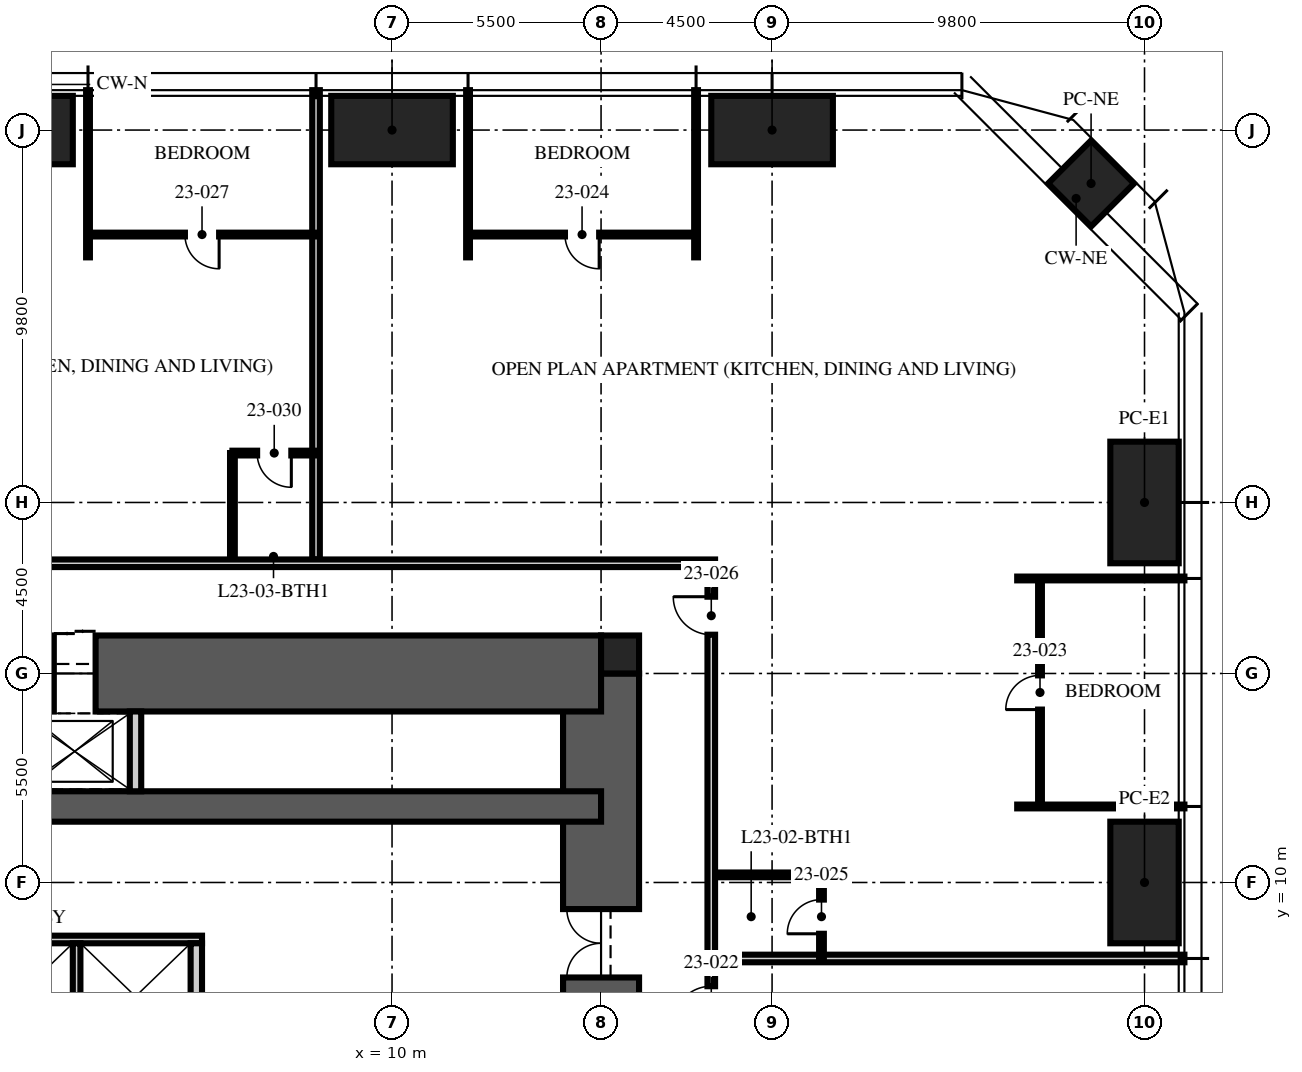
"""IFC4 building model, lengths in metres.
Left out: names, types, materials, properties, quantities, classifications, styles, units other than length and angle.
Written with IfcOpenShell. Run it as: python <this file> out.ifc"""

import sys

from ifc_helpers import new_model, si_unit, direction, frame, frame_2d, origin, origin_2d, place, context, subcontext, project, spatial, rectangle, hollow_rectangle, extrude, element, fill, save


model = new_model("IFC4")
c1 = context("Model", 3, precision=1e-05, world=origin(), true_north=direction((0.0, 1.0)))
c2 = subcontext(c1, "Body", "Model", "MODEL_VIEW")
j1 = project(units=[si_unit("LENGTHUNIT", "METRE"), si_unit("PLANEANGLEUNIT", "RADIAN")], contexts=[c1])
p1 = place(None, origin())
s1 = spatial("IfcSite", under=j1, at=p1, CompositionType="ELEMENT")
p2 = place(p1, origin())
s2 = spatial("IfcBuilding", under=s1, at=p2, CompositionType="ELEMENT")
p3 = place(p2, frame((0.0, 0.0, 92.25)))
s3 = spatial("IfcBuildingStorey", under=s2, at=p3, CompositionType="ELEMENT", Elevation=92.25)
p4 = place(p3, frame((15.5, -15.5, -0.25), z_axis=(0.0, 0.0, 1.0), x_axis=(0.0, 1.0, 0.0)))
e1 = element("IfcWall", 1, at=p4, inside=s3, PredefinedType="SHEAR", context=c2, shape_type="SweptSolid", body=[
    extrude(rectangle(XDim=31.0, YDim=2.0, at=frame_2d((15.5, 0.0))), origin(), (0.0, 0.0, 1.0), 3.75),
])
p5 = place(p4, frame((6.5, 0.0, 0.25)))
e2 = element("IfcOpeningElement", 2, at=p5, cuts=e1, PredefinedType="OPENING", context=c2, shape_type="SweptSolid", body=[
    extrude(rectangle(XDim=1.2, YDim=2.1, at=frame_2d((0.6, 1.05))), frame((0.0, 1.01, 0.0), z_axis=(0.0, -1.0, 0.0), x_axis=(1.0, 0.0, 0.0)), (0.0, 0.0, 1.0), 2.02),
])
p6 = place(p4, frame((23.0, 0.0, 0.25)))
e3 = element("IfcOpeningElement", 3, at=p6, cuts=e1, PredefinedType="OPENING", context=c2, shape_type="SweptSolid", body=[
    extrude(rectangle(XDim=1.8, YDim=2.1, at=frame_2d((0.9, 1.05))), frame((0.0, 1.01, 0.0), z_axis=(0.0, -1.0, 0.0), x_axis=(1.0, 0.0, 0.0)), (0.0, 0.0, 1.0), 2.02),
])
p7 = place(p3, frame((-15.5, 15.5, -0.25), z_axis=(0.0, 0.0, 1.0), x_axis=(1.0, 0.0, 0.0)))
e4 = element("IfcWall", 4, at=p7, inside=s3, PredefinedType="SHEAR", context=c2, shape_type="SweptSolid", body=[
    extrude(rectangle(XDim=31.0, YDim=2.0, at=frame_2d((15.5, 0.0))), origin(), (0.0, 0.0, 1.0), 3.75),
])
p8 = place(p7, frame((10.4, 0.0, 0.25)))
e5 = element("IfcOpeningElement", 5, at=p8, cuts=e4, PredefinedType="OPENING", context=c2, shape_type="SweptSolid", body=[
    extrude(rectangle(XDim=1.1, YDim=2.1, at=frame_2d((0.55, 1.05))), frame((0.0, 1.01, 0.0), z_axis=(0.0, -1.0, 0.0), x_axis=(1.0, 0.0, 0.0)), (0.0, 0.0, 1.0), 2.02),
])
p9 = place(p7, frame((13.5, 0.0, 0.25)))
e6 = element("IfcOpeningElement", 6, at=p9, cuts=e4, PredefinedType="OPENING", context=c2, shape_type="SweptSolid", body=[
    extrude(rectangle(XDim=1.1, YDim=2.1, at=frame_2d((0.55, 1.05))), frame((0.0, 1.01, 0.0), z_axis=(0.0, -1.0, 0.0), x_axis=(1.0, 0.0, 0.0)), (0.0, 0.0, 1.0), 2.02),
])
p10 = place(p7, frame((16.6, 0.0, 0.25)))
e7 = element("IfcOpeningElement", 7, at=p10, cuts=e4, PredefinedType="OPENING", context=c2, shape_type="SweptSolid", body=[
    extrude(rectangle(XDim=1.1, YDim=2.1, at=frame_2d((0.55, 1.05))), frame((0.0, 1.01, 0.0), z_axis=(0.0, -1.0, 0.0), x_axis=(1.0, 0.0, 0.0)), (0.0, 0.0, 1.0), 2.02),
])
p11 = place(p3, frame((-15.5, 12.0, -0.25), z_axis=(0.0, 0.0, 1.0), x_axis=(1.0, 0.0, 0.0)))
e8 = element("IfcWall", 8, at=p11, inside=s3, PredefinedType="SHEAR", context=c2, shape_type="SweptSolid", body=[
    extrude(rectangle(XDim=31.0, YDim=0.8, at=frame_2d((15.5, 0.0))), origin(), (0.0, 0.0, 1.0), 3.75),
])
p12 = place(p3, frame((16.0, 16.0, -0.25), z_axis=(0.0, 0.0, 1.0), x_axis=(1.0, 0.0, 0.0)))
e9 = element("IfcColumn", 9, at=p12, inside=s3, PredefinedType="COLUMN", context=c2, shape_type="SweptSolid", body=[
    extrude(rectangle(XDim=1.0, YDim=1.0, at=origin_2d()), origin(), (0.0, 0.0, 1.0), 3.75),
])
for number, where, z_axis, x_axis in (
    (10, (0.0, 29.8, 0.0), (0.0, 0.0, 1.0), (1.0, 0.0, 0.0)),
    (11, (10.0, 29.8, 0.0), (0.0, 0.0, 1.0), (1.0, 0.0, 0.0)),
    (12, (20.0, 29.8, 0.0), (0.0, 0.0, 1.0), (1.0, 0.0, 0.0)),
    (13, (29.8, 20.0, 0.0), (0.0, 0.0, 1.0), (0.0, 1.0, 0.0)),
    (14, (29.8, 10.0, 0.0), (0.0, 0.0, 1.0), (0.0, 1.0, 0.0)),
):
    element("IfcColumn", number, at=place(p3, frame(where, z_axis=z_axis, x_axis=x_axis)), inside=s3, PredefinedType="COLUMN", context=c2, shape_type="SweptSolid", body=[
        extrude(hollow_rectangle(XDim=3.2, YDim=1.8, WallThickness=0.2, at=origin_2d()), origin(), (0.0, 0.0, 1.0), 3.75),
    ])
p13 = place(p3, frame((28.394, 28.394, 0.0), z_axis=(0.0, 0.0, 1.0), x_axis=(0.707106781187, -0.707106781187, 0.0)))
e15 = element("IfcColumn", 15, at=p13, inside=s3, PredefinedType="COLUMN", context=c2, shape_type="SweptSolid", body=[
    extrude(hollow_rectangle(XDim=1.6, YDim=1.6, WallThickness=0.1, at=origin_2d()), origin(), (0.0, 0.0, 1.0), 3.75),
])
p14 = place(p3, frame((-4.7, 8.5, 0.0), z_axis=(0.0, 0.0, 1.0), x_axis=(1.0, 0.0, 0.0)))
e16 = element("IfcWall", 16, at=p14, inside=s3, PredefinedType="PARTITIONING", context=c2, shape_type="SweptSolid", body=[
    extrude(rectangle(XDim=9.7, YDim=0.2, at=frame_2d((4.85, 0.0))), origin(), (0.0, 0.0, 1.0), 3.5),
])
p15 = place(p3, frame((4.85, 5.6, 0.0), z_axis=(0.0, 0.0, 1.0), x_axis=(0.0, 1.0, 0.0)))
e17 = element("IfcWall", 17, at=p15, inside=s3, PredefinedType="PARTITIONING", context=c2, shape_type="SweptSolid", body=[
    extrude(rectangle(XDim=2.8, YDim=0.3, at=frame_2d((1.4, 0.0))), origin(), (0.0, 0.0, 1.0), 3.5),
])
p16 = place(p3, frame((1.7, 5.6, 0.0), z_axis=(0.0, 0.0, 1.0), x_axis=(0.0, 1.0, 0.0)))
e18 = element("IfcWall", 18, at=p16, inside=s3, PredefinedType="PARTITIONING", context=c2, shape_type="SweptSolid", body=[
    extrude(rectangle(XDim=2.8, YDim=0.2, at=frame_2d((1.4, 0.0))), origin(), (0.0, 0.0, 1.0), 3.5),
])
p17 = place(p3, frame((3.25, 12.4, 0.0), z_axis=(0.0, 0.0, 1.0), x_axis=(0.0, 1.0, 0.0)))
e19 = element("IfcWall", 19, at=p17, inside=s3, PredefinedType="PARTITIONING", context=c2, shape_type="SweptSolid", body=[
    extrude(rectangle(XDim=2.1, YDim=0.3, at=frame_2d((1.05, 0.0))), origin(), (0.0, 0.0, 1.0), 3.5),
])
p18 = place(p3, frame((18.5, 8.0, 0.0), z_axis=(0.0, 0.0, 1.0), x_axis=(1.0, 0.0, 0.0)))
e20 = element("IfcWall", 20, at=p18, inside=s3, PredefinedType="PARTITIONING", context=c2, shape_type="SweptSolid", body=[
    extrude(rectangle(XDim=12.35, YDim=0.2, at=frame_2d((6.175, 0.0))), origin(), (0.0, 0.0, 1.0), 2.61),
])
for number, where, z_axis, x_axis in (
    (21, (26.45, 12.0, 0.0), (0.0, 0.0, 1.0), (1.0, 0.0, 0.0)),
    (22, (26.45, 18.0, 0.0), (0.0, 0.0, 1.0), (1.0, 0.0, 0.0)),
    (23, (18.0, 26.45, 0.0), (0.0, 0.0, 1.0), (0.0, 1.0, 0.0)),
    (24, (12.0, 26.45, 0.0), (0.0, 0.0, 1.0), (0.0, 1.0, 0.0)),
):
    element("IfcWall", number, at=place(p3, frame(where, z_axis=z_axis, x_axis=x_axis)), inside=s3, PredefinedType="PARTITIONING", context=c2, shape_type="SweptSolid", body=[
        extrude(rectangle(XDim=4.4, YDim=0.1, at=frame_2d((2.2, 0.0))), origin(), (0.0, 0.0, 1.0), 2.61),
    ])
p19 = place(p3, frame((8.0, 18.5, 0.0), z_axis=(0.0, 0.0, 1.0), x_axis=(0.0, 1.0, 0.0)))
e25 = element("IfcWall", 25, at=p19, inside=s3, PredefinedType="PARTITIONING", context=c2, shape_type="SweptSolid", body=[
    extrude(rectangle(XDim=12.35, YDim=0.2, at=frame_2d((6.175, 0.0))), origin(), (0.0, 0.0, 1.0), 2.61),
])
p20 = place(p3, frame((2.0, 26.45, 0.0), z_axis=(0.0, 0.0, 1.0), x_axis=(0.0, 1.0, 0.0)))
e26 = element("IfcWall", 26, at=p20, inside=s3, PredefinedType="PARTITIONING", context=c2, shape_type="SweptSolid", body=[
    extrude(rectangle(XDim=4.4, YDim=0.1, at=frame_2d((2.2, 0.0))), origin(), (0.0, 0.0, 1.0), 2.61),
])
p21 = place(p3, frame((27.05, 12.0, 0.0), z_axis=(0.0, 0.0, 1.0), x_axis=(0.0, 1.0, 0.0)))
e27 = element("IfcWall", 27, at=p21, inside=s3, PredefinedType="PARTITIONING", context=c2, shape_type="SweptSolid", body=[
    extrude(rectangle(XDim=6.0, YDim=0.1, at=frame_2d((3.0, 0.0))), origin(), (0.0, 0.0, 1.0), 2.6),
])
p22 = place(p21, frame((2.55, 0.0, 0.0)))
e28 = element("IfcOpeningElement", 28, at=p22, cuts=e27, PredefinedType="OPENING", context=c2, shape_type="SweptSolid", body=[
    extrude(rectangle(XDim=0.9, YDim=2.1, at=frame_2d((0.45, 1.05))), frame((0.0, 0.06, 0.0), z_axis=(0.0, -1.0, 0.0), x_axis=(1.0, 0.0, 0.0)), (0.0, 0.0, 1.0), 0.12),
])
p23 = place(p3, frame((18.0, 27.05, 0.0), z_axis=(0.0, 0.0, 1.0), x_axis=(-1.0, 0.0, 0.0)))
e29 = element("IfcWall", 29, at=p23, inside=s3, PredefinedType="PARTITIONING", context=c2, shape_type="SweptSolid", body=[
    extrude(rectangle(XDim=6.0, YDim=0.1, at=frame_2d((3.0, 0.0))), origin(), (0.0, 0.0, 1.0), 2.6),
])
p24 = place(p23, frame((2.55, 0.0, 0.0)))
e30 = element("IfcOpeningElement", 30, at=p24, cuts=e29, PredefinedType="OPENING", context=c2, shape_type="SweptSolid", body=[
    extrude(rectangle(XDim=0.9, YDim=2.1, at=frame_2d((0.45, 1.05))), frame((0.0, 0.06, 0.0), z_axis=(0.0, -1.0, 0.0), x_axis=(1.0, 0.0, 0.0)), (0.0, 0.0, 1.0), 0.12),
])
p25 = place(p3, frame((21.3, 8.0, 0.0), z_axis=(0.0, 0.0, 1.0), x_axis=(0.0, 1.0, 0.0)))
e31 = element("IfcWall", 31, at=p25, inside=s3, PredefinedType="PARTITIONING", context=c2, shape_type="SweptSolid", body=[
    extrude(rectangle(XDim=2.2, YDim=0.125, at=frame_2d((1.1, 0.0))), origin(), (0.0, 0.0, 1.0), 2.492),
])
p26 = place(p25, frame((0.65, 0.0, 0.0)))
e32 = element("IfcOpeningElement", 32, at=p26, cuts=e31, PredefinedType="OPENING", context=c2, shape_type="SweptSolid", body=[
    extrude(rectangle(XDim=0.9, YDim=2.1, at=frame_2d((0.45, 1.05))), frame((0.0, 0.073, 0.0), z_axis=(0.0, -1.0, 0.0), x_axis=(1.0, 0.0, 0.0)), (0.0, 0.0, 1.0), 0.145),
])
p27 = place(p3, frame((18.5, 10.2, 0.0), z_axis=(0.0, 0.0, 1.0), x_axis=(1.0, 0.0, 0.0)))
e33 = element("IfcWall", 33, at=p27, inside=s3, PredefinedType="PARTITIONING", context=c2, shape_type="SweptSolid", body=[
    extrude(rectangle(XDim=2.8, YDim=0.125, at=frame_2d((1.4, 0.0))), origin(), (0.0, 0.0, 1.0), 2.492),
])
p28 = place(p3, frame((8.0, 27.05, 0.0), z_axis=(0.0, 0.0, 1.0), x_axis=(-1.0, 0.0, 0.0)))
e34 = element("IfcWall", 34, at=p28, inside=s3, PredefinedType="PARTITIONING", context=c2, shape_type="SweptSolid", body=[
    extrude(rectangle(XDim=6.0, YDim=0.1, at=frame_2d((3.0, 0.0))), origin(), (0.0, 0.0, 1.0), 2.6),
])
p29 = place(p28, frame((2.55, 0.0, 0.0)))
e35 = element("IfcOpeningElement", 35, at=p29, cuts=e34, PredefinedType="OPENING", context=c2, shape_type="SweptSolid", body=[
    extrude(rectangle(XDim=0.9, YDim=2.1, at=frame_2d((0.45, 1.05))), frame((0.0, 0.06, 0.0), z_axis=(0.0, -1.0, 0.0), x_axis=(1.0, 0.0, 0.0)), (0.0, 0.0, 1.0), 0.12),
])
p30 = place(p3, frame((8.0, 21.3, 0.0), z_axis=(0.0, 0.0, 1.0), x_axis=(-1.0, 0.0, 0.0)))
e36 = element("IfcWall", 36, at=p30, inside=s3, PredefinedType="PARTITIONING", context=c2, shape_type="SweptSolid", body=[
    extrude(rectangle(XDim=2.2, YDim=0.125, at=frame_2d((1.1, 0.0))), origin(), (0.0, 0.0, 1.0), 3.5),
])
p31 = place(p30, frame((0.65, 0.0, 0.0)))
e37 = element("IfcOpeningElement", 37, at=p31, cuts=e36, PredefinedType="OPENING", context=c2, shape_type="SweptSolid", body=[
    extrude(rectangle(XDim=0.9, YDim=2.1, at=frame_2d((0.45, 1.05))), frame((0.0, 0.073, 0.0), z_axis=(0.0, -1.0, 0.0), x_axis=(1.0, 0.0, 0.0)), (0.0, 0.0, 1.0), 0.145),
])
p32 = place(p3, frame((5.8, 18.5, 0.0), z_axis=(0.0, 0.0, 1.0), x_axis=(0.0, 1.0, 0.0)))
e38 = element("IfcWall", 38, at=p32, inside=s3, PredefinedType="PARTITIONING", context=c2, shape_type="SweptSolid", body=[
    extrude(rectangle(XDim=2.8, YDim=0.125, at=frame_2d((1.4, 0.0))), origin(), (0.0, 0.0, 1.0), 3.5),
])
p33 = place(p3, frame((18.4, -18.3, 0.0), z_axis=(0.0, 0.0, 1.0), x_axis=(0.0, 1.0, 0.0)))
e39 = element("IfcWall", 39, at=p33, inside=s3, PredefinedType="PARTITIONING", context=c2, shape_type="SweptSolid", body=[
    extrude(rectangle(XDim=36.6, YDim=0.2, at=frame_2d((18.3, 0.0))), origin(), (0.0, 0.0, 1.0), 2.3),
])
p34 = place(p33, frame((24.57, 0.0, 0.0)))
e40 = element("IfcOpeningElement", 40, at=p34, cuts=e39, PredefinedType="OPENING", context=c2, shape_type="SweptSolid", body=[
    extrude(rectangle(XDim=1.0, YDim=2.2, at=frame_2d((0.5, 1.1))), frame((0.0, 0.11, 0.0), z_axis=(0.0, -1.0, 0.0), x_axis=(1.0, 0.0, 0.0)), (0.0, 0.0, 1.0), 0.22),
])
p35 = place(p33, frame((34.82, 0.0, 0.0)))
e41 = element("IfcOpeningElement", 41, at=p35, cuts=e39, PredefinedType="OPENING", context=c2, shape_type="SweptSolid", body=[
    extrude(rectangle(XDim=1.0, YDim=2.2, at=frame_2d((0.5, 1.1))), frame((0.0, 0.11, 0.0), z_axis=(0.0, -1.0, 0.0), x_axis=(1.0, 0.0, 0.0)), (0.0, 0.0, 1.0), 0.22),
])
p36 = place(p33, frame((8.7, 0.0, 0.0)))
e42 = element("IfcOpeningElement", 42, at=p36, cuts=e39, PredefinedType="OPENING", context=c2, shape_type="SweptSolid", body=[
    extrude(rectangle(XDim=1.0, YDim=2.2, at=frame_2d((0.5, 1.1))), frame((0.0, 0.11, 0.0), z_axis=(0.0, -1.0, 0.0), x_axis=(1.0, 0.0, 0.0)), (0.0, 0.0, 1.0), 0.22),
])
p37 = place(p3, frame((-6.0, 18.4, 0.0), z_axis=(0.0, 0.0, 1.0), x_axis=(1.0, 0.0, 0.0)))
e43 = element("IfcWall", 43, at=p37, inside=s3, PredefinedType="PARTITIONING", context=c2, shape_type="SweptSolid", body=[
    extrude(rectangle(XDim=24.5, YDim=0.2, at=frame_2d((12.25, 0.0))), origin(), (0.0, 0.0, 1.0), 2.3),
])
p38 = place(p6, origin())
e44 = element("IfcDoor", 44, at=p38, inside=s3, OperationType="DOUBLE_DOOR_SINGLE_SWING", PredefinedType="DOOR", context=c2, shape_type="SweptSolid", body=[
    extrude(rectangle(XDim=1.8, YDim=2.1, at=frame_2d((0.9, 1.05))), frame((0.0, 0.025, 0.0), z_axis=(0.0, -1.0, 0.0), x_axis=(1.0, 0.0, 0.0)), (0.0, 0.0, 1.0), 0.05),
])
fill(e3, e44)
p39 = place(p10, origin())
e45 = element("IfcDoor", 45, at=p39, inside=s3, OperationType="DOUBLE_DOOR_SLIDING", PredefinedType="DOOR", context=c2, shape_type="SweptSolid", body=[
    extrude(rectangle(XDim=1.1, YDim=2.1, at=frame_2d((0.55, 1.05))), frame((0.0, 0.025, 0.0), z_axis=(0.0, -1.0, 0.0), x_axis=(1.0, 0.0, 0.0)), (0.0, 0.0, 1.0), 0.05),
])
fill(e7, e45)
p40 = place(p34, origin())
e46 = element("IfcDoor", 46, at=p40, inside=s3, OperationType="SINGLE_SWING_LEFT", PredefinedType="DOOR", context=c2, shape_type="SweptSolid", body=[
    extrude(rectangle(XDim=1.0, YDim=2.2, at=frame_2d((0.5, 1.1))), frame((0.0, 0.025, 0.0), z_axis=(0.0, -1.0, 0.0), x_axis=(1.0, 0.0, 0.0)), (0.0, 0.0, 1.0), 0.05),
])
fill(e40, e46)
p41 = place(p22, origin())
e47 = element("IfcDoor", 47, at=p41, inside=s3, OperationType="SINGLE_SWING_LEFT", PredefinedType="DOOR", context=c2, shape_type="SweptSolid", body=[
    extrude(rectangle(XDim=0.9, YDim=2.1, at=frame_2d((0.45, 1.05))), frame((0.0, 0.025, 0.0), z_axis=(0.0, -1.0, 0.0), x_axis=(1.0, 0.0, 0.0)), (0.0, 0.0, 1.0), 0.05),
])
fill(e28, e47)
p42 = place(p24, origin())
e48 = element("IfcDoor", 48, at=p42, inside=s3, OperationType="SINGLE_SWING_LEFT", PredefinedType="DOOR", context=c2, shape_type="SweptSolid", body=[
    extrude(rectangle(XDim=0.9, YDim=2.1, at=frame_2d((0.45, 1.05))), frame((0.0, 0.025, 0.0), z_axis=(0.0, -1.0, 0.0), x_axis=(1.0, 0.0, 0.0)), (0.0, 0.0, 1.0), 0.05),
])
fill(e30, e48)
p43 = place(p26, origin())
e49 = element("IfcDoor", 49, at=p43, inside=s3, OperationType="SINGLE_SWING_LEFT", PredefinedType="DOOR", context=c2, shape_type="SweptSolid", body=[
    extrude(rectangle(XDim=0.9, YDim=2.1, at=frame_2d((0.45, 1.05))), frame((0.0, 0.025, 0.0), z_axis=(0.0, -1.0, 0.0), x_axis=(1.0, 0.0, 0.0)), (0.0, 0.0, 1.0), 0.05),
])
fill(e32, e49)
p44 = place(p35, origin())
e50 = element("IfcDoor", 50, at=p44, inside=s3, OperationType="SINGLE_SWING_RIGHT", PredefinedType="DOOR", context=c2, shape_type="SweptSolid", body=[
    extrude(rectangle(XDim=1.0, YDim=2.2, at=frame_2d((0.5, 1.1))), frame((0.0, 0.025, 0.0), z_axis=(0.0, -1.0, 0.0), x_axis=(1.0, 0.0, 0.0)), (0.0, 0.0, 1.0), 0.05),
])
fill(e41, e50)
p45 = place(p29, origin())
e51 = element("IfcDoor", 51, at=p45, inside=s3, OperationType="SINGLE_SWING_LEFT", PredefinedType="DOOR", context=c2, shape_type="SweptSolid", body=[
    extrude(rectangle(XDim=0.9, YDim=2.1, at=frame_2d((0.45, 1.05))), frame((0.0, 0.025, 0.0), z_axis=(0.0, -1.0, 0.0), x_axis=(1.0, 0.0, 0.0)), (0.0, 0.0, 1.0), 0.05),
])
fill(e35, e51)
p46 = place(p31, origin())
e52 = element("IfcDoor", 52, at=p46, inside=s3, OperationType="SINGLE_SWING_LEFT", PredefinedType="DOOR", context=c2, shape_type="SweptSolid", body=[
    extrude(rectangle(XDim=0.9, YDim=2.1, at=frame_2d((0.45, 1.05))), frame((0.0, 0.025, 0.0), z_axis=(0.0, -1.0, 0.0), x_axis=(1.0, 0.0, 0.0)), (0.0, 0.0, 1.0), 0.05),
])
fill(e37, e52)
save(model, sys.argv[1])
